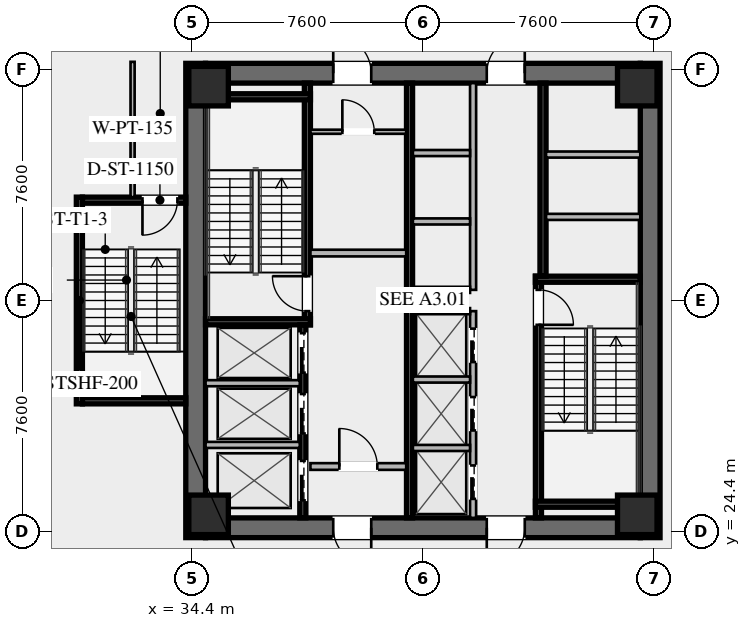
"""IFC4 building model, lengths in metres.
Left out: names, types, materials, properties, quantities, classifications, styles, units other than length and angle.
Written with IfcOpenShell. Run it as: python <this file> out.ifc"""

import sys

from ifc_helpers import new_model, si_unit, direction, frame, frame_2d, origin, origin_2d, place, context, subcontext, project, spatial, rectangle, hollow_rectangle, extrude, element, fill, save


model = new_model("IFC4")
c1 = context("Model", 3, precision=1e-05, world=origin(), true_north=direction((0.0, 1.0)))
c2 = subcontext(c1, "Body", "Model", "MODEL_VIEW")
j1 = project(units=[si_unit("LENGTHUNIT", "METRE"), si_unit("PLANEANGLEUNIT", "RADIAN")], contexts=[c1])
p1 = place(None, origin())
s1 = spatial("IfcSite", under=j1, at=p1, CompositionType="ELEMENT")
p2 = place(p1, origin())
s2 = spatial("IfcBuilding", under=s1, at=p2, CompositionType="ELEMENT")
p3 = place(p2, frame((0.0, 0.0, 19.8)))
s3 = spatial("IfcBuildingStorey", under=s2, at=p3, CompositionType="ELEMENT", Elevation=19.8)
for number, where, z_axis, x_axis in (
    (1, (34.525, 24.2, 0.0), (0.0, 0.0, 1.0), (0.0, 1.0, 0.0)),
    (2, (49.475, 39.8, 0.0), (0.0, 0.0, 1.0), (0.0, -1.0, 0.0)),
):
    element("IfcWall", number, at=place(p3, frame(where, z_axis=z_axis, x_axis=x_axis)), inside=s3, PredefinedType="SHEAR", context=c2, shape_type="SweptSolid", body=[
        extrude(rectangle(XDim=15.6, YDim=0.65, at=frame_2d((7.8, 0.0))), origin(), (0.0, 0.0, 1.0), 4.8),
    ])
p4 = place(p3, frame((49.15, 24.525, 0.0), z_axis=(0.0, 0.0, 1.0), x_axis=(-1.0, 0.0, 0.0)))
e3 = element("IfcWall", 3, at=p4, inside=s3, PredefinedType="SHEAR", context=c2, shape_type="SweptSolid", body=[
    extrude(rectangle(XDim=14.3, YDim=0.65, at=frame_2d((7.15, 0.0))), origin(), (0.0, 0.0, 1.0), 4.8),
])
p5 = place(p4, frame((8.85, 0.0, 0.0)))
e4 = element("IfcOpeningElement", 4, at=p5, cuts=e3, PredefinedType="OPENING", context=c2, shape_type="SweptSolid", body=[
    extrude(rectangle(XDim=1.25, YDim=2.25, at=frame_2d((0.625, 1.125))), frame((0.0, 0.335, 0.0), z_axis=(0.0, -1.0, 0.0), x_axis=(1.0, 0.0, 0.0)), (0.0, 0.0, 1.0), 0.67),
])
p6 = place(p4, frame((3.8, 0.0, 0.0)))
e5 = element("IfcOpeningElement", 5, at=p6, cuts=e3, PredefinedType="OPENING", context=c2, shape_type="SweptSolid", body=[
    extrude(rectangle(XDim=1.25, YDim=2.25, at=frame_2d((0.625, 1.125))), frame((0.0, 0.335, 0.0), z_axis=(0.0, -1.0, 0.0), x_axis=(1.0, 0.0, 0.0)), (0.0, 0.0, 1.0), 0.67),
])
p7 = place(p3, frame((34.85, 39.475, 0.0), z_axis=(0.0, 0.0, 1.0), x_axis=(1.0, 0.0, 0.0)))
e6 = element("IfcWall", 6, at=p7, inside=s3, PredefinedType="SHEAR", context=c2, shape_type="SweptSolid", body=[
    extrude(rectangle(XDim=14.3, YDim=0.65, at=frame_2d((7.15, 0.0))), origin(), (0.0, 0.0, 1.0), 4.8),
])
p8 = place(p7, frame((4.2, 0.0, 0.0)))
e7 = element("IfcOpeningElement", 7, at=p8, cuts=e6, PredefinedType="OPENING", context=c2, shape_type="SweptSolid", body=[
    extrude(rectangle(XDim=1.25, YDim=2.25, at=frame_2d((0.625, 1.125))), frame((0.0, 0.335, 0.0), z_axis=(0.0, -1.0, 0.0), x_axis=(1.0, 0.0, 0.0)), (0.0, 0.0, 1.0), 0.67),
])
p9 = place(p7, frame((9.25, 0.0, 0.0)))
e8 = element("IfcOpeningElement", 8, at=p9, cuts=e6, PredefinedType="OPENING", context=c2, shape_type="SweptSolid", body=[
    extrude(rectangle(XDim=1.25, YDim=2.25, at=frame_2d((0.625, 1.125))), frame((0.0, 0.335, 0.0), z_axis=(0.0, -1.0, 0.0), x_axis=(1.0, 0.0, 0.0)), (0.0, 0.0, 1.0), 0.67),
])
for number, where, z_axis, x_axis in (
    (9, (34.95, 24.95, 0.0), (0.0, 0.0, 1.0), (1.0, 0.0, 0.0)),
    (10, (49.05, 24.95, 0.0), (0.0, 0.0, 1.0), (1.0, 0.0, 0.0)),
    (11, (49.05, 39.05, 0.0), (0.0, 0.0, 1.0), (1.0, 0.0, 0.0)),
    (12, (34.95, 39.05, 0.0), (0.0, 0.0, 1.0), (1.0, 0.0, 0.0)),
):
    element("IfcColumn", number, at=place(p3, frame(where, z_axis=z_axis, x_axis=x_axis)), inside=s3, PredefinedType="COLUMN", context=c2, shape_type="SweptSolid", body=[
        extrude(hollow_rectangle(XDim=1.3, YDim=1.3, WallThickness=0.05, at=origin_2d()), origin(), (0.0, 0.0, 1.0), 4.6),
    ])
p10 = place(p3, frame((38.2, 31.2, 0.0), z_axis=(0.0, 0.0, 1.0), x_axis=(0.0, 1.0, 0.0)))
e13 = element("IfcWall", 13, at=p10, inside=s3, PredefinedType="SHEAR", context=c2, shape_type="SweptSolid", body=[
    extrude(rectangle(XDim=7.95, YDim=0.2, at=frame_2d((3.975, 0.0))), origin(), (0.0, 0.0, 1.0), 4.6),
])
p11 = place(p10, frame((0.45, 0.0, 0.0)))
e14 = element("IfcOpeningElement", 14, at=p11, cuts=e13, PredefinedType="OPENING", context=c2, shape_type="SweptSolid", body=[
    extrude(rectangle(XDim=1.15, YDim=2.2, at=frame_2d((0.575, 1.1))), frame((0.0, 0.11, 0.0), z_axis=(0.0, -1.0, 0.0), x_axis=(1.0, 0.0, 0.0)), (0.0, 0.0, 1.0), 0.22),
])
for number, where, z_axis, x_axis in (
    (15, (34.85, 31.3, 0.0), (0.0, 0.0, 1.0), (1.0, 0.0, 0.0)),
    (16, (34.85, 38.7, 0.0), (0.0, 0.0, 1.0), (1.0, 0.0, 0.0)),
):
    element("IfcWall", number, at=place(p3, frame(where, z_axis=z_axis, x_axis=x_axis)), inside=s3, PredefinedType="SHEAR", context=c2, shape_type="SweptSolid", body=[
        extrude(rectangle(XDim=3.45, YDim=0.2, at=frame_2d((1.725, 0.0))), origin(), (0.0, 0.0, 1.0), 4.6),
    ])
p12 = place(p3, frame((45.8, 32.8, 0.0), z_axis=(0.0, 0.0, 1.0), x_axis=(0.0, -1.0, 0.0)))
e17 = element("IfcWall", 17, at=p12, inside=s3, PredefinedType="SHEAR", context=c2, shape_type="SweptSolid", body=[
    extrude(rectangle(XDim=7.95, YDim=0.2, at=frame_2d((3.975, 0.0))), origin(), (0.0, 0.0, 1.0), 4.6),
])
p13 = place(p12, frame((0.45, 0.0, 0.0)))
e18 = element("IfcOpeningElement", 18, at=p13, cuts=e17, PredefinedType="OPENING", context=c2, shape_type="SweptSolid", body=[
    extrude(rectangle(XDim=1.15, YDim=2.2, at=frame_2d((0.575, 1.1))), frame((0.0, 0.11, 0.0), z_axis=(0.0, -1.0, 0.0), x_axis=(1.0, 0.0, 0.0)), (0.0, 0.0, 1.0), 0.22),
])
for number, where, z_axis, x_axis in (
    (19, (45.7, 32.7, 0.0), (0.0, 0.0, 1.0), (1.0, 0.0, 0.0)),
    (20, (45.7, 25.3, 0.0), (0.0, 0.0, 1.0), (1.0, 0.0, 0.0)),
):
    element("IfcWall", number, at=place(p3, frame(where, z_axis=z_axis, x_axis=x_axis)), inside=s3, PredefinedType="SHEAR", context=c2, shape_type="SweptSolid", body=[
        extrude(rectangle(XDim=3.45, YDim=0.2, at=frame_2d((1.725, 0.0))), origin(), (0.0, 0.0, 1.0), 4.6),
    ])
p14 = place(p3, frame((41.56, 24.85, 0.0), z_axis=(0.0, 0.0, 1.0), x_axis=(0.0, 1.0, 0.0)))
e21 = element("IfcWall", 21, at=p14, inside=s3, PredefinedType="SHEAR", context=c2, shape_type="SweptSolid", body=[
    extrude(rectangle(XDim=14.3, YDim=0.2, at=frame_2d((7.15, 0.0))), origin(), (0.0, 0.0, 1.0), 4.6),
])
p15 = place(p3, frame((38.3, 33.56, 0.0), z_axis=(0.0, 0.0, 1.0), x_axis=(1.0, 0.0, 0.0)))
e22 = element("IfcWall", 22, at=p15, inside=s3, PredefinedType="SOLIDWALL", context=c2, shape_type="SweptSolid", body=[
    extrude(rectangle(XDim=3.15, YDim=0.22, at=frame_2d((1.575, 0.0))), origin(), (0.0, 0.0, 1.0), 3.643),
])
p16 = place(p3, frame((38.3, 26.54, 0.0), z_axis=(0.0, 0.0, 1.0), x_axis=(1.0, 0.0, 0.0)))
e23 = element("IfcWall", 23, at=p16, inside=s3, PredefinedType="SOLIDWALL", context=c2, shape_type="SweptSolid", body=[
    extrude(rectangle(XDim=3.15, YDim=0.22, at=frame_2d((1.575, 0.0))), origin(), (0.0, 0.0, 1.0), 3.643),
])
p17 = place(p16, frame((0.95, 0.0, 0.0)))
e24 = element("IfcOpeningElement", 24, at=p17, cuts=e23, PredefinedType="OPENING", context=c2, shape_type="SweptSolid", body=[
    extrude(rectangle(XDim=1.25, YDim=2.25, at=frame_2d((0.625, 1.125))), frame((0.0, 0.12, 0.0), z_axis=(0.0, -1.0, 0.0), x_axis=(1.0, 0.0, 0.0)), (0.0, 0.0, 1.0), 0.24),
])
p18 = place(p3, frame((38.05, 24.85, 0.0), z_axis=(0.0, 0.0, 1.0), x_axis=(0.0, 1.0, 0.0)))
e25 = element("IfcWall", 25, at=p18, inside=s3, PredefinedType="SHEAR", context=c2, shape_type="SweptSolid", body=[
    extrude(rectangle(XDim=6.35, YDim=0.2, at=frame_2d((3.175, 0.0))), origin(), (0.0, 0.0, 1.0), 4.6),
])
p19 = place(p18, frame((4.775, 0.0, 0.0)))
e26 = element("IfcOpeningElement", 26, at=p19, cuts=e25, PredefinedType="OPENING", context=c2, shape_type="SweptSolid", body=[
    extrude(rectangle(XDim=1.3, YDim=2.25, at=frame_2d((0.65, 1.125))), frame((0.0, 0.11, 0.0), z_axis=(0.0, -1.0, 0.0), x_axis=(1.0, 0.0, 0.0)), (0.0, 0.0, 1.0), 0.22),
])
p20 = place(p18, frame((2.775, 0.0, 0.0)))
e27 = element("IfcOpeningElement", 27, at=p20, cuts=e25, PredefinedType="OPENING", context=c2, shape_type="SweptSolid", body=[
    extrude(rectangle(XDim=1.3, YDim=2.25, at=frame_2d((0.65, 1.125))), frame((0.0, 0.11, 0.0), z_axis=(0.0, -1.0, 0.0), x_axis=(1.0, 0.0, 0.0)), (0.0, 0.0, 1.0), 0.22),
])
p21 = place(p18, frame((0.575, 0.0, 0.0)))
e28 = element("IfcOpeningElement", 28, at=p21, cuts=e25, PredefinedType="OPENING", context=c2, shape_type="SweptSolid", body=[
    extrude(rectangle(XDim=1.3, YDim=2.25, at=frame_2d((0.65, 1.125))), frame((0.0, 0.11, 0.0), z_axis=(0.0, -1.0, 0.0), x_axis=(1.0, 0.0, 0.0)), (0.0, 0.0, 1.0), 0.22),
])
for number, where, z_axis, x_axis in (
    (29, (34.85, 27.25, 0.0), (0.0, 0.0, 1.0), (1.0, 0.0, 0.0)),
    (30, (34.85, 29.28, 0.0), (0.0, 0.0, 1.0), (1.0, 0.0, 0.0)),
):
    element("IfcWall", number, at=place(p3, frame(where, z_axis=z_axis, x_axis=x_axis)), inside=s3, PredefinedType="SOLIDWALL", context=c2, shape_type="SweptSolid", body=[
        extrude(rectangle(XDim=3.1, YDim=0.2, at=frame_2d((1.55, 0.0))), origin(), (0.0, 0.0, 1.0), 4.6),
    ])
p22 = place(p3, frame((45.95, 39.15, 0.0), z_axis=(0.0, 0.0, 1.0), x_axis=(0.0, -1.0, 0.0)))
e31 = element("IfcWall", 31, at=p22, inside=s3, PredefinedType="SHEAR", context=c2, shape_type="SweptSolid", body=[
    extrude(rectangle(XDim=6.35, YDim=0.2, at=frame_2d((3.175, 0.0))), origin(), (0.0, 0.0, 1.0), 4.6),
])
for number, where, z_axis, x_axis in (
    (32, (46.05, 34.75, 0.0), (0.0, 0.0, 1.0), (1.0, 0.0, 0.0)),
    (33, (46.05, 36.8, 0.0), (0.0, 0.0, 1.0), (1.0, 0.0, 0.0)),
):
    element("IfcWall", number, at=place(p3, frame(where, z_axis=z_axis, x_axis=x_axis)), inside=s3, PredefinedType="SOLIDWALL", context=c2, shape_type="SweptSolid", body=[
        extrude(rectangle(XDim=3.1, YDim=0.2, at=frame_2d((1.55, 0.0))), origin(), (0.0, 0.0, 1.0), 4.6),
    ])
p23 = place(p3, frame((38.3, 37.55, 0.0), z_axis=(0.0, 0.0, 1.0), x_axis=(1.0, 0.0, 0.0)))
e34 = element("IfcWall", 34, at=p23, inside=s3, PredefinedType="PARTITIONING", context=c2, shape_type="SweptSolid", body=[
    extrude(rectangle(XDim=3.15, YDim=0.135, at=frame_2d((1.575, 0.0))), origin(), (0.0, 0.0, 1.0), 3.643),
])
p24 = place(p23, frame((1.05, 0.0, 0.0)))
e35 = element("IfcOpeningElement", 35, at=p24, cuts=e34, PredefinedType="OPENING", context=c2, shape_type="SweptSolid", body=[
    extrude(rectangle(XDim=1.05, YDim=2.2, at=frame_2d((0.525, 1.1))), frame((0.0, 0.077, 0.0), z_axis=(0.0, -1.0, 0.0), x_axis=(1.0, 0.0, 0.0)), (0.0, 0.0, 1.0), 0.155),
])
p25 = place(p3, frame((43.65, 24.85, 0.0), z_axis=(0.0, 0.0, 1.0), x_axis=(0.0, 1.0, 0.0)))
e36 = element("IfcWall", 36, at=p25, inside=s3, PredefinedType="SOLIDWALL", context=c2, shape_type="SweptSolid", body=[
    extrude(rectangle(XDim=6.8, YDim=0.2, at=frame_2d((3.4, 0.0))), origin(), (0.0, 0.0, 1.0), 4.6),
])
p26 = place(p25, frame((0.625, 0.0, 0.0)))
e37 = element("IfcOpeningElement", 37, at=p26, cuts=e36, PredefinedType="OPENING", context=c2, shape_type="SweptSolid", body=[
    extrude(rectangle(XDim=1.1, YDim=2.2, at=frame_2d((0.55, 1.1))), frame((0.0, 0.11, 0.0), z_axis=(0.0, -1.0, 0.0), x_axis=(1.0, 0.0, 0.0)), (0.0, 0.0, 1.0), 0.22),
])
p27 = place(p25, frame((2.875, 0.0, 0.0)))
e38 = element("IfcOpeningElement", 38, at=p27, cuts=e36, PredefinedType="OPENING", context=c2, shape_type="SweptSolid", body=[
    extrude(rectangle(XDim=1.1, YDim=2.2, at=frame_2d((0.55, 1.1))), frame((0.0, 0.11, 0.0), z_axis=(0.0, -1.0, 0.0), x_axis=(1.0, 0.0, 0.0)), (0.0, 0.0, 1.0), 0.22),
])
p28 = place(p25, frame((5.125, 0.0, 0.0)))
e39 = element("IfcOpeningElement", 39, at=p28, cuts=e36, PredefinedType="OPENING", context=c2, shape_type="SweptSolid", body=[
    extrude(rectangle(XDim=1.1, YDim=2.2, at=frame_2d((0.55, 1.1))), frame((0.0, 0.11, 0.0), z_axis=(0.0, -1.0, 0.0), x_axis=(1.0, 0.0, 0.0)), (0.0, 0.0, 1.0), 0.22),
])
for number, where, z_axis, x_axis in (
    (40, (41.67, 27.15, 0.0), (0.0, 0.0, 1.0), (1.0, 0.0, 0.0)),
    (41, (41.67, 29.4, 0.0), (0.0, 0.0, 1.0), (1.0, 0.0, 0.0)),
    (42, (41.67, 31.65, 0.0), (0.0, 0.0, 1.0), (1.0, 0.0, 0.0)),
):
    element("IfcWall", number, at=place(p3, frame(where, z_axis=z_axis, x_axis=x_axis)), inside=s3, PredefinedType="SOLIDWALL", context=c2, shape_type="SweptSolid", body=[
        extrude(rectangle(XDim=1.88, YDim=0.2, at=frame_2d((0.94, 0.0))), origin(), (0.0, 0.0, 1.0), 4.6),
    ])
p29 = place(p3, frame((43.65, 32.35, 0.0), z_axis=(0.0, 0.0, 1.0), x_axis=(0.0, 1.0, 0.0)))
e43 = element("IfcWall", 43, at=p29, inside=s3, PredefinedType="SOLIDWALL", context=c2, shape_type="SweptSolid", body=[
    extrude(rectangle(XDim=6.8, YDim=0.2, at=frame_2d((3.4, 0.0))), origin(), (0.0, 0.0, 1.0), 4.6),
])
for number, where, z_axis, x_axis in (
    (44, (41.67, 32.35, 0.0), (0.0, 0.0, 1.0), (1.0, 0.0, 0.0)),
    (45, (41.67, 34.6, 0.0), (0.0, 0.0, 1.0), (1.0, 0.0, 0.0)),
    (46, (41.67, 36.85, 0.0), (0.0, 0.0, 1.0), (1.0, 0.0, 0.0)),
):
    element("IfcWall", number, at=place(p3, frame(where, z_axis=z_axis, x_axis=x_axis)), inside=s3, PredefinedType="SOLIDWALL", context=c2, shape_type="SweptSolid", body=[
        extrude(rectangle(XDim=1.88, YDim=0.2, at=frame_2d((0.94, 0.0))), origin(), (0.0, 0.0, 1.0), 4.6),
    ])
p30 = place(p3, frame((30.7, 28.6, 0.0), z_axis=(0.0, 0.0, 1.0), x_axis=(0.0, 1.0, 0.0)))
e47 = element("IfcWall", 47, at=p30, inside=s3, PredefinedType="SHEAR", context=c2, shape_type="SweptSolid", body=[
    extrude(rectangle(XDim=6.8, YDim=0.2, at=frame_2d((3.4, 0.0))), origin(), (0.0, 0.0, 1.0), 4.6),
])
p31 = place(p3, frame((34.2, 35.3, 0.0), z_axis=(0.0, 0.0, 1.0), x_axis=(-1.0, 0.0, 0.0)))
e48 = element("IfcWall", 48, at=p31, inside=s3, PredefinedType="SHEAR", context=c2, shape_type="SweptSolid", body=[
    extrude(rectangle(XDim=3.4, YDim=0.2, at=frame_2d((1.7, 0.0))), origin(), (0.0, 0.0, 1.0), 4.6),
])
p32 = place(p31, frame((0.275, 0.0, 0.0)))
e49 = element("IfcOpeningElement", 49, at=p32, cuts=e48, PredefinedType="OPENING", context=c2, shape_type="SweptSolid", body=[
    extrude(rectangle(XDim=1.15, YDim=2.2, at=frame_2d((0.575, 1.1))), frame((0.0, 0.11, 0.0), z_axis=(0.0, -1.0, 0.0), x_axis=(1.0, 0.0, 0.0)), (0.0, 0.0, 1.0), 0.22),
])
p33 = place(p3, frame((30.8, 28.7, 0.0), z_axis=(0.0, 0.0, 1.0), x_axis=(1.0, 0.0, 0.0)))
e50 = element("IfcWall", 50, at=p33, inside=s3, PredefinedType="SHEAR", context=c2, shape_type="SweptSolid", body=[
    extrude(rectangle(XDim=3.4, YDim=0.2, at=frame_2d((1.7, 0.0))), origin(), (0.0, 0.0, 1.0), 4.6),
])
p34 = place(p3, frame((32.45, 35.4, 0.0), z_axis=(0.0, 0.0, 1.0), x_axis=(0.0, 1.0, 0.0)))
e51 = element("IfcWall", 51, at=p34, inside=s3, PredefinedType="PARTITIONING", context=c2, shape_type="SweptSolid", body=[
    extrude(rectangle(XDim=4.45, YDim=0.135, at=frame_2d((2.225, 0.0))), origin(), (0.0, 0.0, 1.0), 3.643),
])
p35 = place(p8, origin())
e52 = element("IfcDoor", 52, at=p35, inside=s3, OperationType="SINGLE_SWING_LEFT", PredefinedType="DOOR", context=c2, shape_type="SweptSolid", body=[
    extrude(rectangle(XDim=1.25, YDim=2.25, at=frame_2d((0.625, 1.125))), frame((0.0, 0.025, 0.0), z_axis=(0.0, -1.0, 0.0), x_axis=(1.0, 0.0, 0.0)), (0.0, 0.0, 1.0), 0.05),
])
fill(e7, e52)
p36 = place(p9, origin())
e53 = element("IfcDoor", 53, at=p36, inside=s3, OperationType="SINGLE_SWING_RIGHT", PredefinedType="DOOR", context=c2, shape_type="SweptSolid", body=[
    extrude(rectangle(XDim=1.25, YDim=2.25, at=frame_2d((0.625, 1.125))), frame((0.0, 0.025, 0.0), z_axis=(0.0, -1.0, 0.0), x_axis=(1.0, 0.0, 0.0)), (0.0, 0.0, 1.0), 0.05),
])
fill(e8, e53)
p37 = place(p5, origin())
e54 = element("IfcDoor", 54, at=p37, inside=s3, OperationType="SINGLE_SWING_LEFT", PredefinedType="DOOR", context=c2, shape_type="SweptSolid", body=[
    extrude(rectangle(XDim=1.25, YDim=2.25, at=frame_2d((0.625, 1.125))), frame((0.0, 0.025, 0.0), z_axis=(0.0, -1.0, 0.0), x_axis=(1.0, 0.0, 0.0)), (0.0, 0.0, 1.0), 0.05),
])
fill(e4, e54)
p38 = place(p6, origin())
e55 = element("IfcDoor", 55, at=p38, inside=s3, OperationType="SINGLE_SWING_RIGHT", PredefinedType="DOOR", context=c2, shape_type="SweptSolid", body=[
    extrude(rectangle(XDim=1.25, YDim=2.25, at=frame_2d((0.625, 1.125))), frame((0.0, 0.025, 0.0), z_axis=(0.0, -1.0, 0.0), x_axis=(1.0, 0.0, 0.0)), (0.0, 0.0, 1.0), 0.05),
])
fill(e5, e55)
p39 = place(p11, origin())
e56 = element("IfcDoor", 56, at=p39, inside=s3, OperationType="SINGLE_SWING_RIGHT", PredefinedType="DOOR", context=c2, shape_type="SweptSolid", body=[
    extrude(rectangle(XDim=1.15, YDim=2.2, at=frame_2d((0.575, 1.1))), frame((0.0, 0.025, 0.0), z_axis=(0.0, -1.0, 0.0), x_axis=(1.0, 0.0, 0.0)), (0.0, 0.0, 1.0), 0.05),
])
fill(e14, e56)
p40 = place(p13, origin())
e57 = element("IfcDoor", 57, at=p40, inside=s3, OperationType="SINGLE_SWING_RIGHT", PredefinedType="DOOR", context=c2, shape_type="SweptSolid", body=[
    extrude(rectangle(XDim=1.15, YDim=2.2, at=frame_2d((0.575, 1.1))), frame((0.0, 0.025, 0.0), z_axis=(0.0, -1.0, 0.0), x_axis=(1.0, 0.0, 0.0)), (0.0, 0.0, 1.0), 0.05),
])
fill(e18, e57)
p41 = place(p17, origin())
e58 = element("IfcDoor", 58, at=p41, inside=s3, OperationType="SINGLE_SWING_LEFT", PredefinedType="DOOR", context=c2, shape_type="SweptSolid", body=[
    extrude(rectangle(XDim=1.25, YDim=2.25, at=frame_2d((0.625, 1.125))), frame((0.0, 0.025, 0.0), z_axis=(0.0, -1.0, 0.0), x_axis=(1.0, 0.0, 0.0)), (0.0, 0.0, 1.0), 0.05),
])
fill(e24, e58)
p42 = place(p24, origin())
e59 = element("IfcDoor", 59, at=p42, inside=s3, OperationType="SINGLE_SWING_LEFT", PredefinedType="DOOR", context=c2, shape_type="SweptSolid", body=[
    extrude(rectangle(XDim=1.05, YDim=2.2, at=frame_2d((0.525, 1.1))), frame((0.0, 0.025, 0.0), z_axis=(0.0, -1.0, 0.0), x_axis=(1.0, 0.0, 0.0)), (0.0, 0.0, 1.0), 0.05),
])
fill(e35, e59)
p43 = place(p32, origin())
e60 = element("IfcDoor", 60, at=p43, inside=s3, OperationType="SINGLE_SWING_RIGHT", PredefinedType="DOOR", context=c2, shape_type="SweptSolid", body=[
    extrude(rectangle(XDim=1.15, YDim=2.2, at=frame_2d((0.575, 1.1))), frame((0.0, 0.025, 0.0), z_axis=(0.0, -1.0, 0.0), x_axis=(1.0, 0.0, 0.0)), (0.0, 0.0, 1.0), 0.05),
])
fill(e49, e60)
p44 = place(p19, origin())
e61 = element("IfcDoor", 61, at=p44, inside=s3, OperationType="SLIDING_TO_LEFT", PredefinedType="DOOR", context=c2, shape_type="SweptSolid", body=[
    extrude(rectangle(XDim=1.3, YDim=2.25, at=frame_2d((0.65, 1.125))), frame((0.0, 0.025, 0.0), z_axis=(0.0, -1.0, 0.0), x_axis=(1.0, 0.0, 0.0)), (0.0, 0.0, 1.0), 0.05),
])
fill(e26, e61)
p45 = place(p20, origin())
e62 = element("IfcDoor", 62, at=p45, inside=s3, OperationType="SLIDING_TO_LEFT", PredefinedType="DOOR", context=c2, shape_type="SweptSolid", body=[
    extrude(rectangle(XDim=1.3, YDim=2.25, at=frame_2d((0.65, 1.125))), frame((0.0, 0.025, 0.0), z_axis=(0.0, -1.0, 0.0), x_axis=(1.0, 0.0, 0.0)), (0.0, 0.0, 1.0), 0.05),
])
fill(e27, e62)
p46 = place(p21, origin())
e63 = element("IfcDoor", 63, at=p46, inside=s3, OperationType="SLIDING_TO_LEFT", PredefinedType="DOOR", context=c2, shape_type="SweptSolid", body=[
    extrude(rectangle(XDim=1.3, YDim=2.25, at=frame_2d((0.65, 1.125))), frame((0.0, 0.025, 0.0), z_axis=(0.0, -1.0, 0.0), x_axis=(1.0, 0.0, 0.0)), (0.0, 0.0, 1.0), 0.05),
])
fill(e28, e63)
p47 = place(p26, origin())
e64 = element("IfcDoor", 64, at=p47, inside=s3, OperationType="SLIDING_TO_LEFT", PredefinedType="DOOR", context=c2, shape_type="SweptSolid", body=[
    extrude(rectangle(XDim=1.1, YDim=2.2, at=frame_2d((0.55, 1.1))), frame((0.0, 0.025, 0.0), z_axis=(0.0, -1.0, 0.0), x_axis=(1.0, 0.0, 0.0)), (0.0, 0.0, 1.0), 0.05),
])
fill(e37, e64)
p48 = place(p27, origin())
e65 = element("IfcDoor", 65, at=p48, inside=s3, OperationType="SLIDING_TO_LEFT", PredefinedType="DOOR", context=c2, shape_type="SweptSolid", body=[
    extrude(rectangle(XDim=1.1, YDim=2.2, at=frame_2d((0.55, 1.1))), frame((0.0, 0.025, 0.0), z_axis=(0.0, -1.0, 0.0), x_axis=(1.0, 0.0, 0.0)), (0.0, 0.0, 1.0), 0.05),
])
fill(e38, e65)
p49 = place(p28, origin())
e66 = element("IfcDoor", 66, at=p49, inside=s3, OperationType="SLIDING_TO_LEFT", PredefinedType="DOOR", context=c2, shape_type="SweptSolid", body=[
    extrude(rectangle(XDim=1.1, YDim=2.2, at=frame_2d((0.55, 1.1))), frame((0.0, 0.025, 0.0), z_axis=(0.0, -1.0, 0.0), x_axis=(1.0, 0.0, 0.0)), (0.0, 0.0, 1.0), 0.05),
])
fill(e39, e66)
save(model, sys.argv[1])
